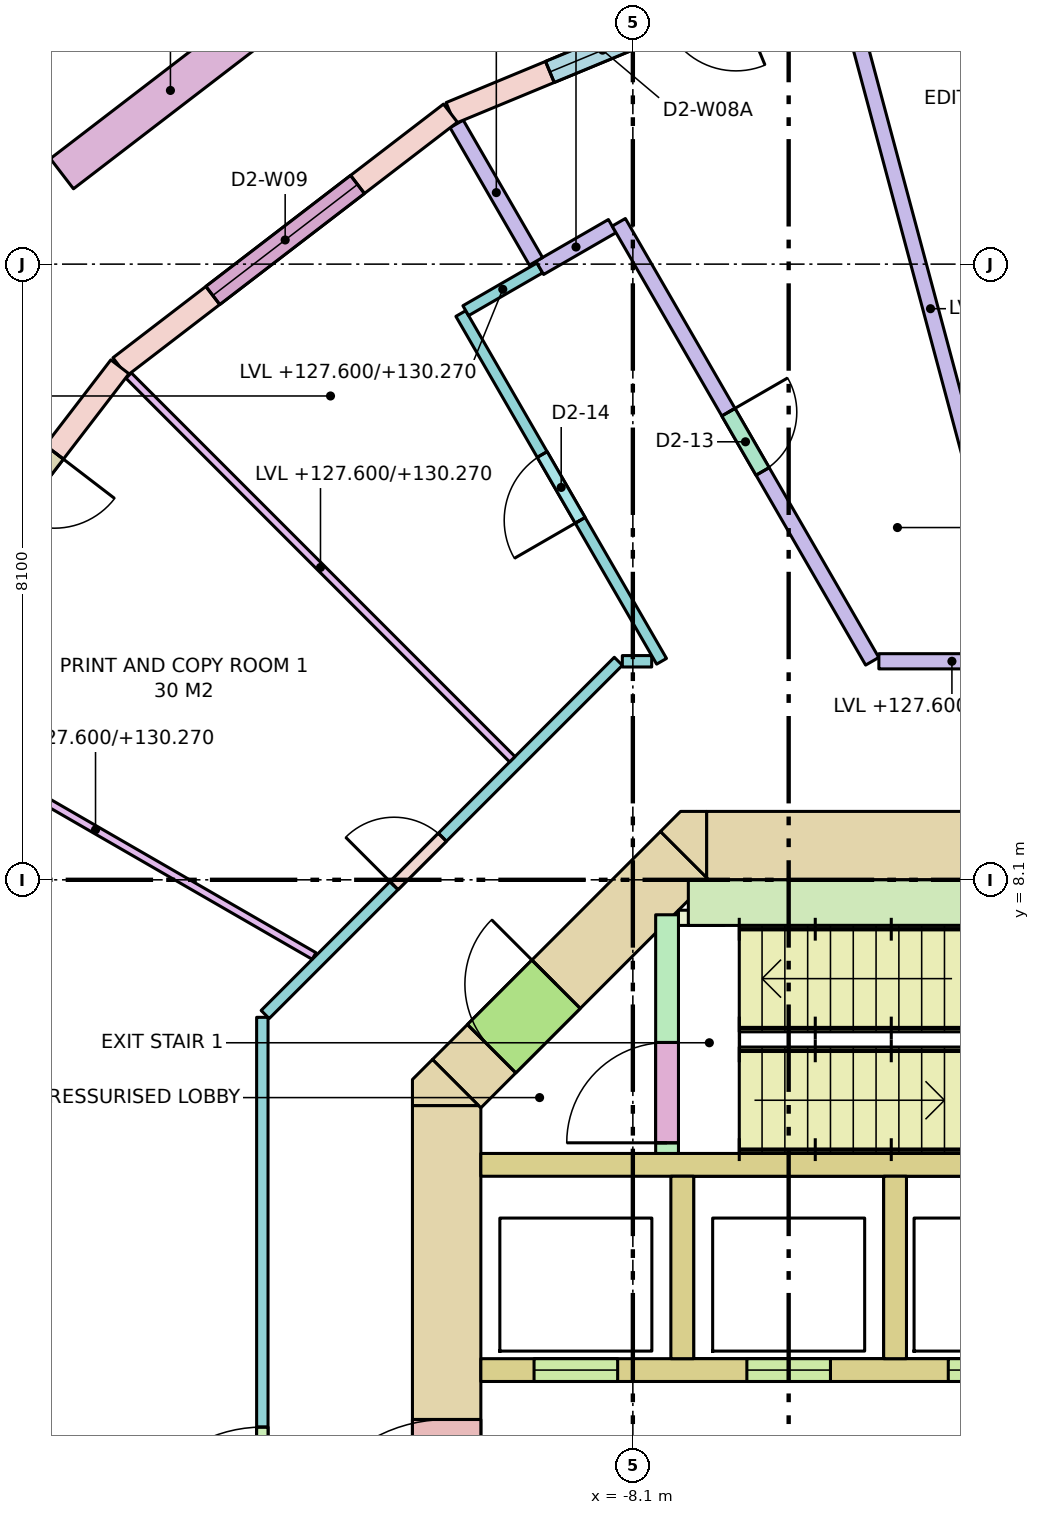
"""IFC4 building model, lengths in metres.
Left out: names, types, materials, properties, quantities, classifications, styles, units other than length and angle.
Written with IfcOpenShell. Run it as: python <this file> out.ifc"""

import sys

from ifc_helpers import new_model, si_unit, direction, frame, frame_2d, origin, place, context, subcontext, project, spatial, polyline, rectangle, outline, extrude, element, fill, save


model = new_model("IFC4")
c1 = context("Model", 3, precision=1e-05, world=origin(), true_north=direction((0.0, 1.0)))
c2 = subcontext(c1, "Body", "Model", "MODEL_VIEW")
j1 = project(units=[si_unit("LENGTHUNIT", "METRE"), si_unit("PLANEANGLEUNIT", "RADIAN")], contexts=[c1])
p1 = place(None, origin())
s1 = spatial("IfcSite", under=j1, at=p1, CompositionType="ELEMENT")
p2 = place(p1, origin())
s2 = spatial("IfcBuilding", under=s1, at=p2, CompositionType="ELEMENT")
p3 = place(p2, frame((0.0, 0.0, 127.6)))
s3 = spatial("IfcBuildingStorey", under=s2, at=p3, CompositionType="ELEMENT", Elevation=127.6)
p4 = place(p3, frame((-7.13, 8.55, -0.28), z_axis=(0.0, 0.0, 1.0), x_axis=(1.0, 0.0, 0.0)))
e1 = element("IfcWall", 1, at=p4, inside=s3, PredefinedType="SHEAR", context=c2, shape_type="SweptSolid", body=[
    extrude(rectangle(XDim=14.26, YDim=0.9, at=frame_2d((7.13, 0.0))), origin(), (0.0, 0.0, 1.0), 3.8),
])
p5 = place(p4, frame((5.48, 0.0, 0.28)))
e2 = element("IfcOpeningElement", 2, at=p5, cuts=e1, PredefinedType="OPENING", context=c2, shape_type="SweptSolid", body=[
    extrude(rectangle(XDim=0.7, YDim=2.1, at=frame_2d((0.35, 1.05))), frame((0.0, 0.46, 0.0), z_axis=(0.0, -1.0, 0.0), x_axis=(1.0, 0.0, 0.0)), (0.0, 0.0, 1.0), 0.92),
])
p6 = place(p4, frame((7.155, 0.0, 0.28)))
e3 = element("IfcOpeningElement", 3, at=p6, cuts=e1, PredefinedType="OPENING", context=c2, shape_type="SweptSolid", body=[
    extrude(rectangle(XDim=0.9, YDim=2.1, at=frame_2d((0.45, 1.05))), frame((0.0, 0.46, 0.0), z_axis=(0.0, -1.0, 0.0), x_axis=(1.0, 0.0, 0.0)), (0.0, 0.0, 1.0), 0.92),
])
p7 = place(p3, frame((-10.55, -5.13, -0.28), z_axis=(0.0, 0.0, 1.0), x_axis=(0.0, 1.0, 0.0)))
e4 = element("IfcWall", 4, at=p7, inside=s3, PredefinedType="SHEAR", context=c2, shape_type="SweptSolid", body=[
    extrude(rectangle(XDim=10.26, YDim=0.9, at=frame_2d((5.13, 0.0))), origin(), (0.0, 0.0, 1.0), 3.8),
])
p8 = place(p7, frame((4.13, 0.0, 0.28)))
e5 = element("IfcOpeningElement", 5, at=p8, cuts=e4, PredefinedType="OPENING", context=c2, shape_type="SweptSolid", body=[
    extrude(rectangle(XDim=2.0, YDim=2.1, at=frame_2d((1.0, 1.05))), frame((0.0, 0.46, 0.0), z_axis=(0.0, -1.0, 0.0), x_axis=(1.0, 0.0, 0.0)), (0.0, 0.0, 1.0), 0.92),
])
p9 = place(p3, frame((-10.418, 5.418, -0.28), z_axis=(0.0, 0.0, 1.0), x_axis=(0.707106781187, 0.707106781187, 0.0)))
e6 = element("IfcWall", 6, at=p9, inside=s3, PredefinedType="SHEAR", context=c2, shape_type="SweptSolid", body=[
    extrude(rectangle(XDim=4.243, YDim=0.9, at=frame_2d((2.121, 0.0))), origin(), (0.0, 0.0, 1.0), 3.8),
])
p10 = place(p9, frame((0.65, 0.0, 0.28)))
e7 = element("IfcOpeningElement", 7, at=p10, cuts=e6, PredefinedType="OPENING", context=c2, shape_type="SweptSolid", body=[
    extrude(rectangle(XDim=1.2, YDim=2.1, at=frame_2d((0.6, 1.05))), frame((0.0, 0.46, 0.0), z_axis=(0.0, -1.0, 0.0), x_axis=(1.0, 0.0, 0.0)), (0.0, 0.0, 1.0), 0.92),
])
p11 = place(p3, frame((0.0, 0.0, -0.28)))
e8 = element("IfcWall", 8, at=p11, inside=s3, PredefinedType="SHEAR", context=c2, shape_type="SweptSolid", body=[
    extrude(outline(polyline([(-10.736, 5.736), (-10.13, 5.13), (-11.0, 5.13), (-11.0, 5.473), (-10.736, 5.736)])), origin(), (0.0, 0.0, 1.0), 3.8),
])
p12 = place(p3, frame((0.0, 0.0, -0.28)))
e9 = element("IfcWall", 9, at=p12, inside=s3, PredefinedType="SHEAR", context=c2, shape_type="SweptSolid", body=[
    extrude(outline(polyline([(-7.473, 9.0), (-7.13, 9.0), (-7.13, 8.13), (-7.736, 8.736), (-7.473, 9.0)])), origin(), (0.0, 0.0, 1.0), 3.8),
])
p13 = place(p3, frame((-10.1, 4.35, 0.0), z_axis=(0.0, 0.0, 1.0), x_axis=(1.0, 0.0, 0.0)))
e10 = element("IfcWall", 10, at=p13, inside=s3, PredefinedType="SOLIDWALL", context=c2, shape_type="SweptSolid", body=[
    extrude(rectangle(XDim=8.1, YDim=0.3, at=frame_2d((4.05, 0.0))), origin(), (0.0, 0.0, 1.0), 3.52),
])
p14 = place(p3, frame((-10.1, 1.65, 0.0), z_axis=(0.0, 0.0, 1.0), x_axis=(1.0, 0.0, 0.0)))
e11 = element("IfcWall", 11, at=p14, inside=s3, PredefinedType="SOLIDWALL", context=c2, shape_type="SweptSolid", body=[
    extrude(rectangle(XDim=8.1, YDim=0.3, at=frame_2d((4.05, 0.0))), origin(), (0.0, 0.0, 1.0), 3.52),
])
p15 = place(p14, frame((0.7, 0.0, 0.0)))
e12 = element("IfcOpeningElement", 12, at=p15, cuts=e11, PredefinedType="OPENING", context=c2, shape_type="SweptSolid", body=[
    extrude(rectangle(XDim=1.1, YDim=2.1, at=frame_2d((0.55, 1.05))), frame((0.0, 0.16, 0.0), z_axis=(0.0, -1.0, 0.0), x_axis=(1.0, 0.0, 0.0)), (0.0, 0.0, 1.0), 0.32),
])
p16 = place(p14, frame((3.5, 0.0, 0.0)))
e13 = element("IfcOpeningElement", 13, at=p16, cuts=e11, PredefinedType="OPENING", context=c2, shape_type="SweptSolid", body=[
    extrude(rectangle(XDim=1.1, YDim=2.1, at=frame_2d((0.55, 1.05))), frame((0.0, 0.16, 0.0), z_axis=(0.0, -1.0, 0.0), x_axis=(1.0, 0.0, 0.0)), (0.0, 0.0, 1.0), 0.32),
])
p17 = place(p14, frame((6.15, 0.0, 0.0)))
e14 = element("IfcOpeningElement", 14, at=p17, cuts=e11, PredefinedType="OPENING", context=c2, shape_type="SweptSolid", body=[
    extrude(rectangle(XDim=1.1, YDim=2.1, at=frame_2d((0.55, 1.05))), frame((0.0, 0.16, 0.0), z_axis=(0.0, -1.0, 0.0), x_axis=(1.0, 0.0, 0.0)), (0.0, 0.0, 1.0), 0.32),
])
for number, where, z_axis, x_axis in (
    (15, (-7.45, 1.8, 0.0), (0.0, 0.0, 1.0), (0.0, 1.0, 0.0)),
    (16, (-4.65, 1.8, 0.0), (0.0, 0.0, 1.0), (0.0, 1.0, 0.0)),
):
    element("IfcWall", number, at=place(p3, frame(where, z_axis=z_axis, x_axis=x_axis)), inside=s3, PredefinedType="SOLIDWALL", context=c2, shape_type="SweptSolid", body=[
        extrude(rectangle(XDim=2.4, YDim=0.3, at=frame_2d((1.2, 0.0))), origin(), (0.0, 0.0, 1.0), 3.52),
    ])
p18 = place(p3, frame((-7.65, 4.5, 0.0), z_axis=(0.0, 0.0, 1.0), x_axis=(0.0, 1.0, 0.0)))
e17 = element("IfcWall", 17, at=p18, inside=s3, PredefinedType="SHEAR", context=c2, shape_type="SweptSolid", body=[
    extrude(rectangle(XDim=3.14, YDim=0.3, at=frame_2d((1.57, 0.0))), origin(), (0.0, 0.0, 1.0), 3.52),
])
p19 = place(p18, frame((0.14, 0.0, 0.0)))
e18 = element("IfcOpeningElement", 18, at=p19, cuts=e17, PredefinedType="OPENING", context=c2, shape_type="SweptSolid", body=[
    extrude(rectangle(XDim=1.32, YDim=2.1, at=frame_2d((0.66, 1.05))), frame((0.0, 0.16, 0.0), z_axis=(0.0, -1.0, 0.0), x_axis=(1.0, 0.0, 0.0)), (0.0, 0.0, 1.0), 0.32),
])
p20 = place(p3, frame((-7.37, 7.8, 0.0), z_axis=(0.0, 0.0, 1.0), x_axis=(1.0, 0.0, 0.0)))
e19 = element("IfcWall", 19, at=p20, inside=s3, PredefinedType="SHEAR", context=c2, shape_type="SweptSolid", body=[
    extrude(rectangle(XDim=5.37, YDim=0.6, at=frame_2d((2.685, 0.0))), origin(), (0.0, 0.0, 1.0), 3.52),
])
p21 = place(p3, frame((-7.5, 7.6, 0.0), z_axis=(0.0, 0.0, 1.0), x_axis=(1.0, 0.0, 0.0)))
e20 = element("IfcWall", 20, at=p21, inside=s3, PredefinedType="SHEAR", context=c2, shape_type="SweptSolid", body=[
    extrude(rectangle(XDim=0.6, YDim=0.2, at=frame_2d((0.3, 0.0))), origin(), (0.0, 0.0, 1.0), 3.52),
])
p22 = place(p3, frame((-5.435, 20.284, 0.0), z_axis=(0.0, 0.0, 1.0), x_axis=(-0.923877333662, -0.382688740813, 0.0)))
e21 = element("IfcWall", 21, at=p22, inside=s3, PredefinedType="STANDARD", context=c2, shape_type="SweptSolid", body=[
    extrude(rectangle(XDim=5.482, YDim=0.3, at=frame_2d((2.741, 0.0))), origin(), (0.0, 0.0, 1.0), 3.52),
])
p23 = place(p22, frame((1.416, 0.0, 0.0)))
e22 = element("IfcOpeningElement", 22, at=p23, cuts=e21, PredefinedType="OPENING", context=c2, shape_type="SweptSolid", body=[
    extrude(rectangle(XDim=1.0, YDim=2.4, at=frame_2d((0.5, 1.2))), frame((0.0, 0.16, 0.0), z_axis=(0.0, -1.0, 0.0), x_axis=(1.0, 0.0, 0.0)), (0.0, 0.0, 1.0), 0.32),
])
p24 = place(p22, frame((2.566, 0.0, 0.8)))
e23 = element("IfcOpeningElement", 23, at=p24, cuts=e21, PredefinedType="OPENING", context=c2, shape_type="SweptSolid", body=[
    extrude(rectangle(XDim=1.5, YDim=2.5, at=frame_2d((0.75, 1.25))), frame((0.0, 0.16, 0.0), z_axis=(0.0, -1.0, 0.0), x_axis=(1.0, 0.0, 0.0)), (0.0, 0.0, 1.0), 0.32),
])
p25 = place(p3, frame((-10.5, 18.187, 0.0), z_axis=(0.0, 0.0, 1.0), x_axis=(-0.793335336593, -0.608784891166, 0.0)))
e24 = element("IfcWall", 24, at=p25, inside=s3, PredefinedType="STANDARD", context=c2, shape_type="SweptSolid", body=[
    extrude(rectangle(XDim=5.482, YDim=0.3, at=frame_2d((2.741, 0.0))), origin(), (0.0, 0.0, 1.0), 3.52),
])
p26 = place(p25, frame((1.541, 0.0, 0.8)))
e25 = element("IfcOpeningElement", 25, at=p26, cuts=e24, PredefinedType="OPENING", context=c2, shape_type="SweptSolid", body=[
    extrude(rectangle(XDim=2.4, YDim=2.5, at=frame_2d((1.2, 1.25))), frame((0.0, 0.16, 0.0), z_axis=(0.0, -1.0, 0.0), x_axis=(1.0, 0.0, 0.0)), (0.0, 0.0, 1.0), 0.32),
])
p27 = place(p3, frame((-14.849, 14.849, 0.0), z_axis=(0.0, 0.0, 1.0), x_axis=(-0.608784891166, -0.793335336593, 0.0)))
e26 = element("IfcWall", 26, at=p27, inside=s3, PredefinedType="STANDARD", context=c2, shape_type="SweptSolid", body=[
    extrude(rectangle(XDim=5.482, YDim=0.3, at=frame_2d((2.741, 0.0))), origin(), (0.0, 0.0, 1.0), 3.52),
])
p28 = place(p27, frame((1.416, 0.0, 0.0)))
e27 = element("IfcOpeningElement", 27, at=p28, cuts=e26, PredefinedType="OPENING", context=c2, shape_type="SweptSolid", body=[
    extrude(rectangle(XDim=1.0, YDim=2.4, at=frame_2d((0.5, 1.2))), frame((0.0, 0.16, 0.0), z_axis=(0.0, -1.0, 0.0), x_axis=(1.0, 0.0, 0.0)), (0.0, 0.0, 1.0), 0.32),
])
p29 = place(p27, frame((2.566, 0.0, 0.8)))
e28 = element("IfcOpeningElement", 28, at=p29, cuts=e26, PredefinedType="OPENING", context=c2, shape_type="SweptSolid", body=[
    extrude(rectangle(XDim=1.5, YDim=2.5, at=frame_2d((0.75, 1.25))), frame((0.0, 0.16, 0.0), z_axis=(0.0, -1.0, 0.0), x_axis=(1.0, 0.0, 0.0)), (0.0, 0.0, 1.0), 0.32),
])
p30 = place(p3, frame((-12.756, 19.581, 0.0), z_axis=(0.0, 0.0, 1.0), x_axis=(-0.793384730612, -0.608720518162, 0.0)))
e29 = element("IfcWall", 29, at=p30, inside=s3, PredefinedType="PARAPET", context=c2, shape_type="SweptSolid", body=[
    extrude(rectangle(XDim=3.6, YDim=0.5, at=frame_2d((1.8, 0.0))), origin(), (0.0, 0.0, 1.0), 0.9),
])
p31 = place(p3, frame((-12.975, -6.291, 0.0), z_axis=(0.0, 0.0, 1.0), x_axis=(0.0, 1.0, 0.0)))
e30 = element("IfcWall", 30, at=p31, inside=s3, PredefinedType="PARTITIONING", context=c2, shape_type="SweptSolid", body=[
    extrude(rectangle(XDim=12.582, YDim=0.15, at=frame_2d((6.291, 0.0))), origin(), (0.0, 0.0, 1.0), 2.67),
])
p32 = place(p31, frame((5.391, 0.0, 0.0)))
e31 = element("IfcOpeningElement", 31, at=p32, cuts=e30, PredefinedType="OPENING", context=c2, shape_type="SweptSolid", body=[
    extrude(rectangle(XDim=1.8, YDim=2.1, at=frame_2d((0.9, 1.05))), frame((0.0, 0.085, 0.0), z_axis=(0.0, -1.0, 0.0), x_axis=(1.0, 0.0, 0.0)), (0.0, 0.0, 1.0), 0.17),
])
p33 = place(p3, frame((-12.938, 6.328, 0.0), z_axis=(0.0, 0.0, 1.0), x_axis=(0.707088206597, 0.707125355289, 0.0)))
e32 = element("IfcWall", 32, at=p33, inside=s3, PredefinedType="PARTITIONING", context=c2, shape_type="SweptSolid", body=[
    extrude(rectangle(XDim=6.572, YDim=0.15, at=frame_2d((3.286, 0.0))), origin(), (0.0, 0.0, 1.0), 2.67),
])
p34 = place(p33, frame((2.398, 0.0, 0.0)))
e33 = element("IfcOpeningElement", 33, at=p34, cuts=e32, PredefinedType="OPENING", context=c2, shape_type="SweptSolid", body=[
    extrude(rectangle(XDim=0.9, YDim=2.1, at=frame_2d((0.45, 1.05))), frame((0.0, 0.085, 0.0), z_axis=(0.0, -1.0, 0.0), x_axis=(1.0, 0.0, 0.0)), (0.0, 0.0, 1.0), 0.17),
])
p35 = place(p3, frame((-8.238, 10.975, 0.0), z_axis=(0.0, 0.0, 1.0), x_axis=(1.0, 0.0, 0.0)))
e34 = element("IfcWall", 34, at=p35, inside=s3, PredefinedType="PARTITIONING", context=c2, shape_type="SweptSolid", body=[
    extrude(rectangle(XDim=0.386, YDim=0.15, at=frame_2d((0.193, 0.0))), origin(), (0.0, 0.0, 1.0), 3.52),
])
p36 = place(p3, frame((-7.722, 10.975, 0.0), z_axis=(0.0, 0.0, 1.0), x_axis=(-0.499981143329, 0.866036290415, 0.0)))
e35 = element("IfcWall", 35, at=p36, inside=s3, PredefinedType="PARTITIONING", context=c2, shape_type="SweptSolid", body=[
    extrude(rectangle(XDim=5.283, YDim=0.15, at=frame_2d((2.642, 0.0))), origin(), (0.0, 0.0, 1.0), 3.52),
])
p37 = place(p36, frame((2.142, 0.0, 0.0)))
e36 = element("IfcOpeningElement", 36, at=p37, cuts=e35, PredefinedType="OPENING", context=c2, shape_type="SweptSolid", body=[
    extrude(rectangle(XDim=1.0, YDim=2.1, at=frame_2d((0.5, 1.05))), frame((0.0, 0.085, 0.0), z_axis=(0.0, -1.0, 0.0), x_axis=(1.0, 0.0, 0.0)), (0.0, 0.0, 1.0), 0.17),
])
p38 = place(p3, frame((-10.299, 15.588, 0.0), z_axis=(0.0, 0.0, 1.0), x_axis=(0.86599040064, 0.500060622324, 0.0)))
e37 = element("IfcWall", 37, at=p38, inside=s3, PredefinedType="PARTITIONING", context=c2, shape_type="SweptSolid", body=[
    extrude(rectangle(XDim=1.125, YDim=0.15, at=frame_2d((0.562, 0.0))), origin(), (0.0, 0.0, 1.0), 2.67),
])
p39 = place(p3, frame((-9.324, 16.15, 0.0), z_axis=(0.0, 0.0, 1.0), x_axis=(0.866159722779, 0.499767280476, 0.0)))
e38 = element("IfcWall", 38, at=p39, inside=s3, PredefinedType="PARTITIONING", context=c2, shape_type="SweptSolid", body=[
    extrude(rectangle(XDim=1.1, YDim=0.2, at=frame_2d((0.55, 0.0))), origin(), (0.0, 0.0, 1.0), 2.67),
])
p40 = place(p3, frame((-8.285, 16.75, 0.0), z_axis=(0.0, 0.0, 1.0), x_axis=(0.500021399824, -0.866013048238, 0.0)))
e39 = element("IfcWall", 39, at=p40, inside=s3, PredefinedType="PARTITIONING", context=c2, shape_type="SweptSolid", body=[
    extrude(rectangle(XDim=6.669, YDim=0.2, at=frame_2d((3.334, 0.0))), origin(), (0.0, 0.0, 1.0), 3.52),
])
p41 = place(p40, frame((2.884, 0.0, 0.0)))
e40 = element("IfcOpeningElement", 40, at=p41, cuts=e39, PredefinedType="OPENING", context=c2, shape_type="SweptSolid", body=[
    extrude(rectangle(XDim=0.9, YDim=2.1, at=frame_2d((0.45, 1.05))), frame((0.0, 0.11, 0.0), z_axis=(0.0, -1.0, 0.0), x_axis=(1.0, 0.0, 0.0)), (0.0, 0.0, 1.0), 0.22),
])
p42 = place(p3, frame((-4.863, 10.975, 0.0), z_axis=(0.0, 0.0, 1.0), x_axis=(1.0, 0.0, 0.0)))
e41 = element("IfcWall", 41, at=p42, inside=s3, PredefinedType="PARTITIONING", context=c2, shape_type="SweptSolid", body=[
    extrude(rectangle(XDim=1.923, YDim=0.2, at=frame_2d((0.961, 0.0))), origin(), (0.0, 0.0, 1.0), 2.67),
])
p43 = place(p3, frame((-2.974, 11.101, 0.0), z_axis=(0.0, 0.0, 1.0), x_axis=(-0.258810523233, 0.965928109677, 0.0)))
e42 = element("IfcWall", 42, at=p43, inside=s3, PredefinedType="PARTITIONING", context=c2, shape_type="SweptSolid", body=[
    extrude(rectangle(XDim=9.344, YDim=0.2, at=frame_2d((4.672, 0.0))), origin(), (0.0, 0.0, 1.0), 2.67),
])
p44 = place(p3, frame((-9.375, 16.237, 0.0), z_axis=(0.0, 0.0, 1.0), x_axis=(-0.499961989906, 0.86604734781, 0.0)))
e43 = element("IfcWall", 43, at=p44, inside=s3, PredefinedType="PARTITIONING", context=c2, shape_type="SweptSolid", body=[
    extrude(rectangle(XDim=2.088, YDim=0.2, at=frame_2d((1.044, 0.0))), origin(), (0.0, 0.0, 1.0), 2.67),
])
p45 = place(p3, frame((-9.686, 9.686, 0.0), z_axis=(0.0, 0.0, 1.0), x_axis=(-0.707106781187, 0.707106781187, 0.0)))
e44 = element("IfcWall", 44, at=p45, inside=s3, PredefinedType="PARTITIONING", context=c2, shape_type="SweptSolid", body=[
    extrude(rectangle(XDim=7.139, YDim=0.1, at=frame_2d((3.569, 0.0))), origin(), (0.0, 0.0, 1.0), 2.67),
])
p46 = place(p3, frame((-12.294, 7.098, 0.0), z_axis=(0.0, 0.0, 1.0), x_axis=(-0.866010486135, 0.500025837236, 0.0)))
e45 = element("IfcWall", 45, at=p46, inside=s3, PredefinedType="PARTITIONING", context=c2, shape_type="SweptSolid", body=[
    extrude(rectangle(XDim=6.641, YDim=0.1, at=frame_2d((3.32, 0.0))), origin(), (0.0, 0.0, 1.0), 2.67),
])
p47 = place(p24, origin())
e46 = element("IfcWindow", 46, at=p47, inside=s3, PartitioningType="SINGLE_PANEL", PredefinedType="WINDOW", context=c2, shape_type="SweptSolid", body=[
    extrude(rectangle(XDim=1.5, YDim=2.5, at=frame_2d((0.75, 1.25))), frame((0.0, 0.03, 0.0), z_axis=(0.0, -1.0, 0.0), x_axis=(1.0, 0.0, 0.0)), (0.0, 0.0, 1.0), 0.06),
])
fill(e23, e46)
p48 = place(p26, origin())
e47 = element("IfcWindow", 47, at=p48, inside=s3, PartitioningType="SINGLE_PANEL", PredefinedType="WINDOW", context=c2, shape_type="SweptSolid", body=[
    extrude(rectangle(XDim=2.4, YDim=2.5, at=frame_2d((1.2, 1.25))), frame((0.0, 0.03, 0.0), z_axis=(0.0, -1.0, 0.0), x_axis=(1.0, 0.0, 0.0)), (0.0, 0.0, 1.0), 0.06),
])
fill(e25, e47)
p49 = place(p28, origin())
e48 = element("IfcDoor", 48, at=p49, inside=s3, OperationType="SINGLE_SWING_LEFT", PredefinedType="DOOR", context=c2, shape_type="SweptSolid", body=[
    extrude(rectangle(XDim=1.0, YDim=2.4, at=frame_2d((0.5, 1.2))), frame((0.0, 0.025, 0.0), z_axis=(0.0, -1.0, 0.0), x_axis=(1.0, 0.0, 0.0)), (0.0, 0.0, 1.0), 0.05),
])
fill(e27, e48)
p50 = place(p15, origin())
e49 = element("IfcDoor", 49, at=p50, inside=s3, OperationType="DOUBLE_DOOR_SLIDING", PredefinedType="DOOR", context=c2, shape_type="SweptSolid", body=[
    extrude(rectangle(XDim=1.1, YDim=2.1, at=frame_2d((0.55, 1.05))), frame((0.0, 0.025, 0.0), z_axis=(0.0, -1.0, 0.0), x_axis=(1.0, 0.0, 0.0)), (0.0, 0.0, 1.0), 0.05),
])
fill(e12, e49)
p51 = place(p16, origin())
e50 = element("IfcDoor", 50, at=p51, inside=s3, OperationType="DOUBLE_DOOR_SLIDING", PredefinedType="DOOR", context=c2, shape_type="SweptSolid", body=[
    extrude(rectangle(XDim=1.1, YDim=2.1, at=frame_2d((0.55, 1.05))), frame((0.0, 0.025, 0.0), z_axis=(0.0, -1.0, 0.0), x_axis=(1.0, 0.0, 0.0)), (0.0, 0.0, 1.0), 0.05),
])
fill(e13, e50)
p52 = place(p17, origin())
e51 = element("IfcDoor", 51, at=p52, inside=s3, OperationType="DOUBLE_DOOR_SLIDING", PredefinedType="DOOR", context=c2, shape_type="SweptSolid", body=[
    extrude(rectangle(XDim=1.1, YDim=2.1, at=frame_2d((0.55, 1.05))), frame((0.0, 0.025, 0.0), z_axis=(0.0, -1.0, 0.0), x_axis=(1.0, 0.0, 0.0)), (0.0, 0.0, 1.0), 0.05),
])
fill(e14, e51)
p53 = place(p19, origin())
e52 = element("IfcDoor", 52, at=p53, inside=s3, OperationType="DOUBLE_DOOR_SINGLE_SWING", PredefinedType="DOOR", context=c2, shape_type="SweptSolid", body=[
    extrude(rectangle(XDim=1.32, YDim=2.1, at=frame_2d((0.66, 1.05))), frame((0.0, 0.025, 0.0), z_axis=(0.0, -1.0, 0.0), x_axis=(1.0, 0.0, 0.0)), (0.0, 0.0, 1.0), 0.05),
])
fill(e18, e52)
p54 = place(p10, origin())
e53 = element("IfcDoor", 53, at=p54, inside=s3, OperationType="SINGLE_SWING_RIGHT", PredefinedType="DOOR", context=c2, shape_type="SweptSolid", body=[
    extrude(rectangle(XDim=1.2, YDim=2.1, at=frame_2d((0.6, 1.05))), frame((0.0, 0.025, 0.0), z_axis=(0.0, -1.0, 0.0), x_axis=(1.0, 0.0, 0.0)), (0.0, 0.0, 1.0), 0.05),
])
fill(e7, e53)
p55 = place(p8, origin())
e54 = element("IfcDoor", 54, at=p55, inside=s3, OperationType="DOUBLE_DOOR_SINGLE_SWING", PredefinedType="DOOR", context=c2, shape_type="SweptSolid", body=[
    extrude(rectangle(XDim=2.0, YDim=2.1, at=frame_2d((1.0, 1.05))), frame((0.0, 0.025, 0.0), z_axis=(0.0, -1.0, 0.0), x_axis=(1.0, 0.0, 0.0)), (0.0, 0.0, 1.0), 0.05),
])
fill(e5, e54)
p56 = place(p32, origin())
e55 = element("IfcDoor", 55, at=p56, inside=s3, OperationType="DOUBLE_DOOR_SINGLE_SWING", PredefinedType="DOOR", context=c2, shape_type="SweptSolid", body=[
    extrude(rectangle(XDim=1.8, YDim=2.1, at=frame_2d((0.9, 1.05))), frame((0.0, 0.025, 0.0), z_axis=(0.0, -1.0, 0.0), x_axis=(1.0, 0.0, 0.0)), (0.0, 0.0, 1.0), 0.05),
])
fill(e31, e55)
p57 = place(p41, origin())
e56 = element("IfcDoor", 56, at=p57, inside=s3, OperationType="SINGLE_SWING_LEFT", PredefinedType="DOOR", context=c2, shape_type="SweptSolid", body=[
    extrude(rectangle(XDim=0.9, YDim=2.1, at=frame_2d((0.45, 1.05))), frame((0.0, 0.025, 0.0), z_axis=(0.0, -1.0, 0.0), x_axis=(1.0, 0.0, 0.0)), (0.0, 0.0, 1.0), 0.05),
])
fill(e40, e56)
p58 = place(p37, origin())
e57 = element("IfcDoor", 57, at=p58, inside=s3, OperationType="SINGLE_SWING_LEFT", PredefinedType="DOOR", context=c2, shape_type="SweptSolid", body=[
    extrude(rectangle(XDim=1.0, YDim=2.1, at=frame_2d((0.5, 1.05))), frame((0.0, 0.025, 0.0), z_axis=(0.0, -1.0, 0.0), x_axis=(1.0, 0.0, 0.0)), (0.0, 0.0, 1.0), 0.05),
])
fill(e36, e57)
p59 = place(p34, origin())
e58 = element("IfcDoor", 58, at=p59, inside=s3, OperationType="SINGLE_SWING_LEFT", PredefinedType="DOOR", context=c2, shape_type="SweptSolid", body=[
    extrude(rectangle(XDim=0.9, YDim=2.1, at=frame_2d((0.45, 1.05))), frame((0.0, 0.025, 0.0), z_axis=(0.0, -1.0, 0.0), x_axis=(1.0, 0.0, 0.0)), (0.0, 0.0, 1.0), 0.05),
])
fill(e33, e58)
save(model, sys.argv[1])
